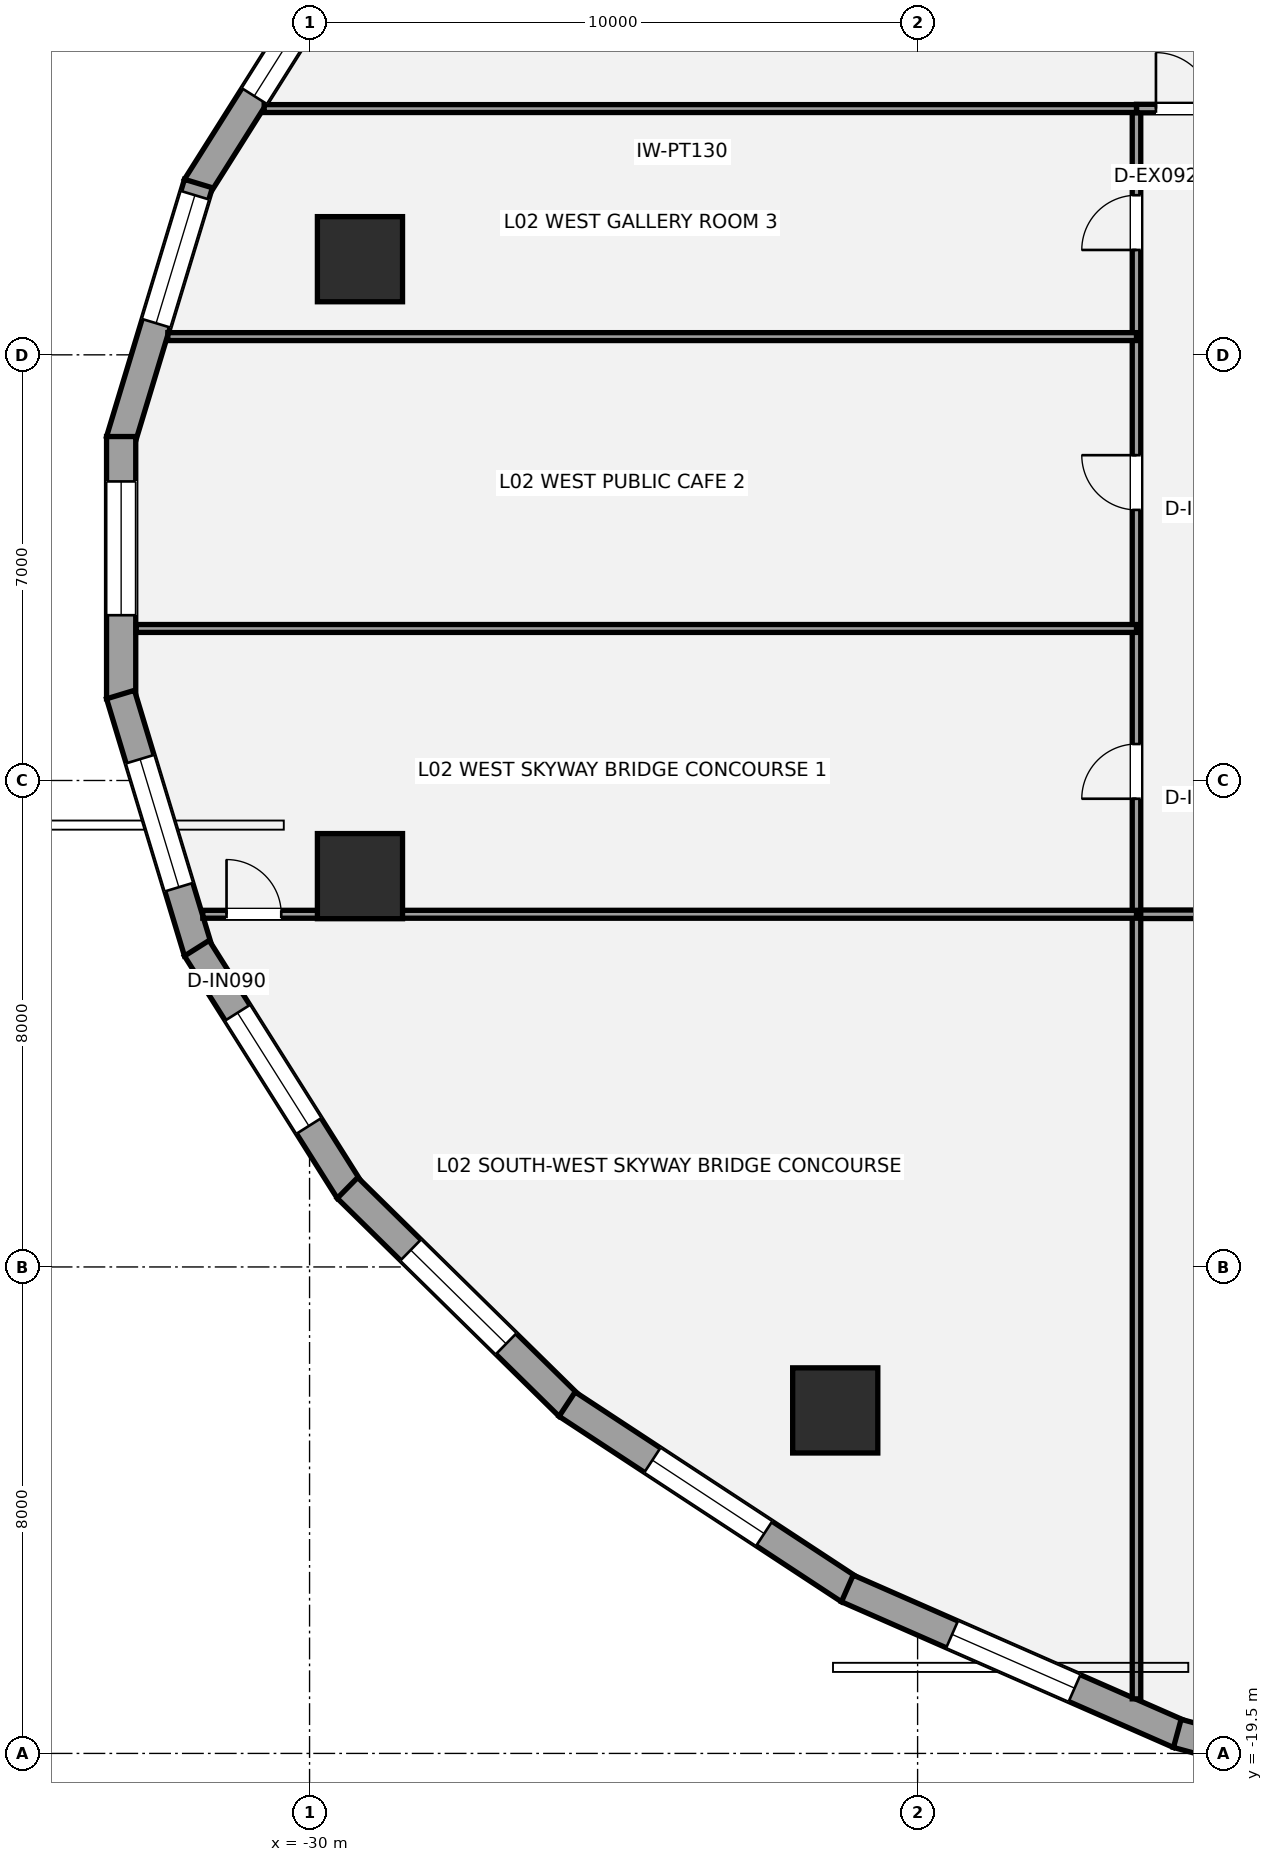
"""IFC4 building model, lengths in metres.
Left out: names, types, materials, properties, quantities, classifications, styles, units other than length and angle.
Written with IfcOpenShell. Run it as: python <this file> out.ifc"""

import sys

from ifc_helpers import new_model, si_unit, direction, frame, frame_2d, origin, origin_2d, place, context, subcontext, project, spatial, rectangle, hollow_circle, extrude, element, fill, save


model = new_model("IFC4")
c1 = context("Model", 3, precision=1e-05, world=origin(), true_north=direction((0.0, 1.0)))
c2 = subcontext(c1, "Body", "Model", "MODEL_VIEW")
j1 = project(units=[si_unit("LENGTHUNIT", "METRE"), si_unit("PLANEANGLEUNIT", "RADIAN")], contexts=[c1])
p1 = place(None, origin())
s1 = spatial("IfcSite", under=j1, at=p1, CompositionType="ELEMENT")
p2 = place(p1, origin())
s2 = spatial("IfcBuilding", under=s1, at=p2, CompositionType="ELEMENT")
p3 = place(p2, frame((0.0, 0.0, 10.2)))
s3 = spatial("IfcBuildingStorey", under=s2, at=p3, CompositionType="ELEMENT", Elevation=10.2)
for number, where, z_axis, x_axis in (
    (1, (-29.171, 5.073, 0.0), (0.0, 0.0, 1.0), (1.0, 0.0, 0.0)),
    (2, (-29.171, -5.073, 0.0), (0.0, 0.0, 1.0), (1.0, 0.0, 0.0)),
    (3, (-21.354, -13.859, 0.0), (0.0, 0.0, 1.0), (1.0, 0.0, 0.0)),
):
    element("IfcColumn", number, at=place(p3, frame(where, z_axis=z_axis, x_axis=x_axis)), inside=s3, PredefinedType="USERDEFINED", context=c2, shape_type="SweptSolid", body=[
        extrude(hollow_circle(Radius=0.7, WallThickness=0.05, at=origin_2d()), origin(), (0.0, 0.0, 1.0), 4.2),
    ])
p4 = place(p3, frame((-31.854, 6.258, 0.0), z_axis=(0.0, 0.0, 1.0), x_axis=(0.53349762721, 0.845801561693, 0.0)))
e4 = element("IfcWall", 4, at=p4, inside=s3, PredefinedType="STANDARD", context=c2, shape_type="SweptSolid", body=[
    extrude(rectangle(XDim=4.711, YDim=0.48, at=frame_2d((2.355, 0.0))), origin(), (0.0, 0.0, 1.0), 3.109),
])
p5 = place(p4, frame((1.771, 0.0, 0.7)))
e5 = element("IfcOpeningElement", 5, at=p5, cuts=e4, PredefinedType="OPENING", context=c2, shape_type="SweptSolid", body=[
    extrude(rectangle(XDim=2.2, YDim=1.95, at=frame_2d((1.1, 0.975))), frame((0.0, 0.25, 0.0), z_axis=(0.0, -1.0, 0.0), x_axis=(1.0, 0.0, 0.0)), (0.0, 0.0, 1.0), 0.5),
])
p6 = place(p3, frame((-33.109, 2.087, 0.0), z_axis=(0.0, 0.0, 1.0), x_axis=(0.289855603468, 0.957070388811, 0.0)))
e6 = element("IfcWall", 6, at=p6, inside=s3, PredefinedType="STANDARD", context=c2, shape_type="SweptSolid", body=[
    extrude(rectangle(XDim=4.419, YDim=0.48, at=frame_2d((2.21, 0.0))), origin(), (0.0, 0.0, 1.0), 3.109),
])
p7 = place(p6, frame((2.02, 0.0, 0.7)))
e7 = element("IfcOpeningElement", 7, at=p7, cuts=e6, PredefinedType="OPENING", context=c2, shape_type="SweptSolid", body=[
    extrude(rectangle(XDim=2.2, YDim=1.95, at=frame_2d((1.1, 0.975))), frame((0.0, 0.25, 0.0), z_axis=(0.0, -1.0, 0.0), x_axis=(1.0, 0.0, 0.0)), (0.0, 0.0, 1.0), 0.5),
])
p8 = place(p3, frame((-33.099, -2.156, 0.0), z_axis=(0.0, 0.0, 1.0), x_axis=(0.0, 1.0, 0.0)))
e8 = element("IfcWall", 8, at=p8, inside=s3, PredefinedType="STANDARD", context=c2, shape_type="SweptSolid", body=[
    extrude(rectangle(XDim=4.313, YDim=0.48, at=frame_2d((2.156, 0.0))), origin(), (0.0, 0.0, 1.0), 3.109),
])
p9 = place(p8, frame((1.375, 0.0, 0.7)))
e9 = element("IfcOpeningElement", 9, at=p9, cuts=e8, PredefinedType="OPENING", context=c2, shape_type="SweptSolid", body=[
    extrude(rectangle(XDim=2.2, YDim=1.95, at=frame_2d((1.1, 0.975))), frame((0.0, 0.25, 0.0), z_axis=(0.0, -1.0, 0.0), x_axis=(1.0, 0.0, 0.0)), (0.0, 0.0, 1.0), 0.5),
])
p10 = place(p3, frame((-31.828, -6.317, 0.0), z_axis=(0.0, 0.0, 1.0), x_axis=(-0.289855603468, 0.957070388811, 0.0)))
e10 = element("IfcWall", 10, at=p10, inside=s3, PredefinedType="STANDARD", context=c2, shape_type="SweptSolid", body=[
    extrude(rectangle(XDim=4.419, YDim=0.48, at=frame_2d((2.21, 0.0))), origin(), (0.0, 0.0, 1.0), 3.109),
])
p11 = place(p10, frame((1.11, 0.0, 0.7)))
e11 = element("IfcOpeningElement", 11, at=p11, cuts=e10, PredefinedType="OPENING", context=c2, shape_type="SweptSolid", body=[
    extrude(rectangle(XDim=2.2, YDim=1.95, at=frame_2d((1.1, 0.975))), frame((0.0, 0.25, 0.0), z_axis=(0.0, -1.0, 0.0), x_axis=(1.0, 0.0, 0.0)), (0.0, 0.0, 1.0), 0.5),
])
p12 = place(p3, frame((-29.341, -10.243, 0.0), z_axis=(0.0, 0.0, 1.0), x_axis=(-0.53349762721, 0.845801561693, 0.0)))
e12 = element("IfcWall", 12, at=p12, inside=s3, PredefinedType="STANDARD", context=c2, shape_type="SweptSolid", body=[
    extrude(rectangle(XDim=4.711, YDim=0.48, at=frame_2d((2.355, 0.0))), origin(), (0.0, 0.0, 1.0), 3.109),
])
p13 = place(p12, frame((1.255, 0.0, 0.7)))
e13 = element("IfcOpeningElement", 13, at=p13, cuts=e12, PredefinedType="OPENING", context=c2, shape_type="SweptSolid", body=[
    extrude(rectangle(XDim=2.2, YDim=1.95, at=frame_2d((1.1, 0.975))), frame((0.0, 0.25, 0.0), z_axis=(0.0, -1.0, 0.0), x_axis=(1.0, 0.0, 0.0)), (0.0, 0.0, 1.0), 0.5),
])
p14 = place(p3, frame((-25.728, -13.785, 0.0), z_axis=(0.0, 0.0, 1.0), x_axis=(-0.713189080178, 0.700971708355, 0.0)))
e14 = element("IfcWall", 14, at=p14, inside=s3, PredefinedType="STANDARD", context=c2, shape_type="SweptSolid", body=[
    extrude(rectangle(XDim=5.116, YDim=0.48, at=frame_2d((2.558, 0.0))), origin(), (0.0, 0.0, 1.0), 3.109),
])
p15 = place(p14, frame((1.458, 0.0, 0.7)))
e15 = element("IfcOpeningElement", 15, at=p15, cuts=e14, PredefinedType="OPENING", context=c2, shape_type="SweptSolid", body=[
    extrude(rectangle(XDim=2.2, YDim=1.95, at=frame_2d((1.1, 0.975))), frame((0.0, 0.25, 0.0), z_axis=(0.0, -1.0, 0.0), x_axis=(1.0, 0.0, 0.0)), (0.0, 0.0, 1.0), 0.5),
])
p16 = place(p3, frame((-21.121, -16.806, 0.0), z_axis=(0.0, 0.0, 1.0), x_axis=(-0.835863918172, 0.548936708827, 0.0)))
e16 = element("IfcWall", 16, at=p16, inside=s3, PredefinedType="STANDARD", context=c2, shape_type="SweptSolid", body=[
    extrude(rectangle(XDim=5.555, YDim=0.48, at=frame_2d((2.778, 0.0))), origin(), (0.0, 0.0, 1.0), 3.109),
])
p17 = place(p16, frame((1.678, 0.0, 0.7)))
e17 = element("IfcOpeningElement", 17, at=p17, cuts=e16, PredefinedType="OPENING", context=c2, shape_type="SweptSolid", body=[
    extrude(rectangle(XDim=2.2, YDim=1.95, at=frame_2d((1.1, 0.975))), frame((0.0, 0.25, 0.0), z_axis=(0.0, -1.0, 0.0), x_axis=(1.0, 0.0, 0.0)), (0.0, 0.0, 1.0), 0.5),
])
p18 = place(p3, frame((-15.695, -19.183, 0.0), z_axis=(0.0, 0.0, 1.0), x_axis=(-0.91570760638, 0.401845218484, 0.0)))
e18 = element("IfcWall", 18, at=p18, inside=s3, PredefinedType="STANDARD", context=c2, shape_type="SweptSolid", body=[
    extrude(rectangle(XDim=5.963, YDim=0.48, at=frame_2d((2.981, 0.0))), origin(), (0.0, 0.0, 1.0), 3.109),
])
p19 = place(p18, frame((1.882, 0.0, 0.7)))
e19 = element("IfcOpeningElement", 19, at=p19, cuts=e18, PredefinedType="OPENING", context=c2, shape_type="SweptSolid", body=[
    extrude(rectangle(XDim=2.2, YDim=1.95, at=frame_2d((1.1, 0.975))), frame((0.0, 0.25, 0.0), z_axis=(0.0, -1.0, 0.0), x_axis=(1.0, 0.0, 0.0)), (0.0, 0.0, 1.0), 0.5),
])
p20 = place(p3, frame((-9.662, -20.821, 0.0), z_axis=(0.0, 0.0, 1.0), x_axis=(-0.964936550718, 0.262483243445, 0.0)))
e20 = element("IfcWall", 20, at=p20, inside=s3, PredefinedType="STANDARD", context=c2, shape_type="SweptSolid", body=[
    extrude(rectangle(XDim=6.288, YDim=0.48, at=frame_2d((3.144, 0.0))), origin(), (0.0, 0.0, 1.0), 3.109),
])
p21 = place(p20, frame((2.044, 0.0, 0.7)))
e21 = element("IfcOpeningElement", 21, at=p21, cuts=e20, PredefinedType="OPENING", context=c2, shape_type="SweptSolid", body=[
    extrude(rectangle(XDim=2.2, YDim=1.95, at=frame_2d((1.1, 0.975))), frame((0.0, 0.25, 0.0), z_axis=(0.0, -1.0, 0.0), x_axis=(1.0, 0.0, 0.0)), (0.0, 0.0, 1.0), 0.5),
])
p22 = place(p3, frame((-16.4, -5.7, 0.0), z_axis=(0.0, 0.0, 1.0), x_axis=(1.0, 0.0, 0.0)))
e22 = element("IfcWall", 22, at=p22, inside=s3, PredefinedType="PARTITIONING", context=c2, shape_type="SweptSolid", body=[
    extrude(rectangle(XDim=32.8, YDim=0.14, at=frame_2d((16.4, 0.0))), origin(), (0.0, 0.0, 1.0), 3.98),
])
p23 = place(p22, frame((4.55, 0.0, 0.0)))
e23 = element("IfcOpeningElement", 23, at=p23, cuts=e22, PredefinedType="OPENING", context=c2, shape_type="SweptSolid", body=[
    extrude(rectangle(XDim=0.9, YDim=2.1, at=frame_2d((0.45, 1.05))), frame((0.0, 0.08, 0.0), z_axis=(0.0, -1.0, 0.0), x_axis=(1.0, 0.0, 0.0)), (0.0, 0.0, 1.0), 0.16),
])
p24 = place(p22, frame((15.95, 0.0, 0.0)))
e24 = element("IfcOpeningElement", 24, at=p24, cuts=e22, PredefinedType="OPENING", context=c2, shape_type="SweptSolid", body=[
    extrude(rectangle(XDim=0.9, YDim=2.1, at=frame_2d((0.45, 1.05))), frame((0.0, 0.08, 0.0), z_axis=(0.0, -1.0, 0.0), x_axis=(1.0, 0.0, 0.0)), (0.0, 0.0, 1.0), 0.16),
])
p25 = place(p22, frame((27.05, 0.0, 0.0)))
e25 = element("IfcOpeningElement", 25, at=p25, cuts=e22, PredefinedType="OPENING", context=c2, shape_type="SweptSolid", body=[
    extrude(rectangle(XDim=1.5, YDim=2.15, at=frame_2d((0.75, 1.075))), frame((0.0, 0.08, 0.0), z_axis=(0.0, -1.0, 0.0), x_axis=(1.0, 0.0, 0.0)), (0.0, 0.0, 1.0), 0.16),
])
p26 = place(p3, frame((-16.4, -18.603, 0.0), z_axis=(0.0, 0.0, 1.0), x_axis=(0.0, 1.0, 0.0)))
e26 = element("IfcWall", 26, at=p26, inside=s3, PredefinedType="PARTITIONING", context=c2, shape_type="SweptSolid", body=[
    extrude(rectangle(XDim=26.153, YDim=0.14, at=frame_2d((13.076, 0.0))), origin(), (0.0, 0.0, 1.0), 3.348),
])
p27 = place(p26, frame((14.802, 0.0, 0.0)))
e27 = element("IfcOpeningElement", 27, at=p27, cuts=e26, PredefinedType="OPENING", context=c2, shape_type="SweptSolid", body=[
    extrude(rectangle(XDim=0.9, YDim=2.1, at=frame_2d((0.45, 1.05))), frame((0.0, 0.08, 0.0), z_axis=(0.0, -1.0, 0.0), x_axis=(1.0, 0.0, 0.0)), (0.0, 0.0, 1.0), 0.16),
])
p28 = place(p26, frame((19.552, 0.0, 0.0)))
e28 = element("IfcOpeningElement", 28, at=p28, cuts=e26, PredefinedType="OPENING", context=c2, shape_type="SweptSolid", body=[
    extrude(rectangle(XDim=0.9, YDim=2.1, at=frame_2d((0.45, 1.05))), frame((0.0, 0.08, 0.0), z_axis=(0.0, -1.0, 0.0), x_axis=(1.0, 0.0, 0.0)), (0.0, 0.0, 1.0), 0.16),
])
p29 = place(p26, frame((23.827, 0.0, 0.0)))
e29 = element("IfcOpeningElement", 29, at=p29, cuts=e26, PredefinedType="OPENING", context=c2, shape_type="SweptSolid", body=[
    extrude(rectangle(XDim=0.9, YDim=2.1, at=frame_2d((0.45, 1.05))), frame((0.0, 0.08, 0.0), z_axis=(0.0, -1.0, 0.0), x_axis=(1.0, 0.0, 0.0)), (0.0, 0.0, 1.0), 0.16),
])
p30 = place(p3, frame((-16.4, 7.55, 0.0), z_axis=(0.0, 0.0, 1.0), x_axis=(1.0, 0.0, 0.0)))
e30 = element("IfcWall", 30, at=p30, inside=s3, PredefinedType="PARTITIONING", context=c2, shape_type="SweptSolid", body=[
    extrude(rectangle(XDim=2.35, YDim=0.14, at=frame_2d((1.175, 0.0))), origin(), (0.0, 0.0, 1.0), 3.433),
])
p31 = place(p30, frame((0.32, 0.0, 0.0)))
e31 = element("IfcOpeningElement", 31, at=p31, cuts=e30, PredefinedType="OPENING", context=c2, shape_type="SweptSolid", body=[
    extrude(rectangle(XDim=0.92, YDim=2.15, at=frame_2d((0.46, 1.075))), frame((0.0, 0.08, 0.0), z_axis=(0.0, -1.0, 0.0), x_axis=(1.0, 0.0, 0.0)), (0.0, 0.0, 1.0), 0.16),
])
p32 = place(p3, frame((-30.747, 7.55, 0.0), z_axis=(0.0, 0.0, 1.0), x_axis=(1.0, 0.0, 0.0)))
e32 = element("IfcWall", 32, at=p32, inside=s3, PredefinedType="PARTITIONING", context=c2, shape_type="SweptSolid", body=[
    extrude(rectangle(XDim=14.347, YDim=0.13, at=frame_2d((7.173, 0.0))), origin(), (0.0, 0.0, 1.0), 2.958),
])
p33 = place(p3, frame((-31.756, -5.7, 0.0), z_axis=(0.0, 0.0, 1.0), x_axis=(1.0, 0.0, 0.0)))
e33 = element("IfcWall", 33, at=p33, inside=s3, PredefinedType="PARTITIONING", context=c2, shape_type="SweptSolid", body=[
    extrude(rectangle(XDim=15.356, YDim=0.13, at=frame_2d((7.678, 0.0))), origin(), (0.0, 0.0, 1.0), 2.958),
])
p34 = place(p33, frame((0.39, 0.0, 0.0)))
e34 = element("IfcOpeningElement", 34, at=p34, cuts=e33, PredefinedType="OPENING", context=c2, shape_type="SweptSolid", body=[
    extrude(rectangle(XDim=0.9, YDim=2.1, at=frame_2d((0.45, 1.05))), frame((0.0, 0.075, 0.0), z_axis=(0.0, -1.0, 0.0), x_axis=(1.0, 0.0, 0.0)), (0.0, 0.0, 1.0), 0.15),
])
p35 = place(p3, frame((-32.851, -1.0, 0.0), z_axis=(0.0, 0.0, 1.0), x_axis=(1.0, 0.0, 0.0)))
e35 = element("IfcWall", 35, at=p35, inside=s3, PredefinedType="PARTITIONING", context=c2, shape_type="SweptSolid", body=[
    extrude(rectangle(XDim=16.451, YDim=0.13, at=frame_2d((8.225, 0.0))), origin(), (0.0, 0.0, 1.0), 3.348),
])
p36 = place(p3, frame((-32.331, 3.8, 0.0), z_axis=(0.0, 0.0, 1.0), x_axis=(1.0, 0.0, 0.0)))
e36 = element("IfcWall", 36, at=p36, inside=s3, PredefinedType="PARTITIONING", context=c2, shape_type="SweptSolid", body=[
    extrude(rectangle(XDim=15.931, YDim=0.13, at=frame_2d((7.966, 0.0))), origin(), (0.0, 0.0, 1.0), 3.348),
])
p37 = place(p5, origin())
e37 = element("IfcWindow", 37, at=p37, inside=s3, PartitioningType="SINGLE_PANEL", PredefinedType="WINDOW", context=c2, shape_type="SweptSolid", body=[
    extrude(rectangle(XDim=2.2, YDim=1.95, at=frame_2d((1.1, 0.975))), frame((0.0, -0.01, 0.0), z_axis=(0.0, -1.0, 0.0), x_axis=(1.0, 0.0, 0.0)), (0.0, 0.0, 1.0), 0.06),
])
fill(e5, e37)
p38 = place(p7, origin())
e38 = element("IfcWindow", 38, at=p38, inside=s3, PartitioningType="SINGLE_PANEL", PredefinedType="WINDOW", context=c2, shape_type="SweptSolid", body=[
    extrude(rectangle(XDim=2.2, YDim=1.95, at=frame_2d((1.1, 0.975))), frame((0.0, -0.01, 0.0), z_axis=(0.0, -1.0, 0.0), x_axis=(1.0, 0.0, 0.0)), (0.0, 0.0, 1.0), 0.06),
])
fill(e7, e38)
p39 = place(p9, origin())
e39 = element("IfcWindow", 39, at=p39, inside=s3, PartitioningType="SINGLE_PANEL", PredefinedType="WINDOW", context=c2, shape_type="SweptSolid", body=[
    extrude(rectangle(XDim=2.2, YDim=1.95, at=frame_2d((1.1, 0.975))), frame((0.0, -0.01, 0.0), z_axis=(0.0, -1.0, 0.0), x_axis=(1.0, 0.0, 0.0)), (0.0, 0.0, 1.0), 0.06),
])
fill(e9, e39)
p40 = place(p11, origin())
e40 = element("IfcWindow", 40, at=p40, inside=s3, PartitioningType="SINGLE_PANEL", PredefinedType="WINDOW", context=c2, shape_type="SweptSolid", body=[
    extrude(rectangle(XDim=2.2, YDim=1.95, at=frame_2d((1.1, 0.975))), frame((0.0, -0.01, 0.0), z_axis=(0.0, -1.0, 0.0), x_axis=(1.0, 0.0, 0.0)), (0.0, 0.0, 1.0), 0.06),
])
fill(e11, e40)
p41 = place(p13, origin())
e41 = element("IfcWindow", 41, at=p41, inside=s3, PartitioningType="SINGLE_PANEL", PredefinedType="WINDOW", context=c2, shape_type="SweptSolid", body=[
    extrude(rectangle(XDim=2.2, YDim=1.95, at=frame_2d((1.1, 0.975))), frame((0.0, -0.01, 0.0), z_axis=(0.0, -1.0, 0.0), x_axis=(1.0, 0.0, 0.0)), (0.0, 0.0, 1.0), 0.06),
])
fill(e13, e41)
p42 = place(p15, origin())
e42 = element("IfcWindow", 42, at=p42, inside=s3, PartitioningType="SINGLE_PANEL", PredefinedType="WINDOW", context=c2, shape_type="SweptSolid", body=[
    extrude(rectangle(XDim=2.2, YDim=1.95, at=frame_2d((1.1, 0.975))), frame((0.0, -0.01, 0.0), z_axis=(0.0, -1.0, 0.0), x_axis=(1.0, 0.0, 0.0)), (0.0, 0.0, 1.0), 0.06),
])
fill(e15, e42)
p43 = place(p17, origin())
e43 = element("IfcWindow", 43, at=p43, inside=s3, PartitioningType="SINGLE_PANEL", PredefinedType="WINDOW", context=c2, shape_type="SweptSolid", body=[
    extrude(rectangle(XDim=2.2, YDim=1.95, at=frame_2d((1.1, 0.975))), frame((0.0, -0.01, 0.0), z_axis=(0.0, -1.0, 0.0), x_axis=(1.0, 0.0, 0.0)), (0.0, 0.0, 1.0), 0.06),
])
fill(e17, e43)
p44 = place(p19, origin())
e44 = element("IfcWindow", 44, at=p44, inside=s3, PartitioningType="SINGLE_PANEL", PredefinedType="WINDOW", context=c2, shape_type="SweptSolid", body=[
    extrude(rectangle(XDim=2.2, YDim=1.95, at=frame_2d((1.1, 0.975))), frame((0.0, -0.01, 0.0), z_axis=(0.0, -1.0, 0.0), x_axis=(1.0, 0.0, 0.0)), (0.0, 0.0, 1.0), 0.06),
])
fill(e19, e44)
p45 = place(p31, origin())
e45 = element("IfcDoor", 45, at=p45, inside=s3, OperationType="SINGLE_SWING_LEFT", PredefinedType="DOOR", context=c2, shape_type="SweptSolid", body=[
    extrude(rectangle(XDim=0.92, YDim=2.15, at=frame_2d((0.46, 1.075))), frame((0.0, 0.025, 0.0), z_axis=(0.0, -1.0, 0.0), x_axis=(1.0, 0.0, 0.0)), (0.0, 0.0, 1.0), 0.05),
])
fill(e31, e45)
p46 = place(p34, origin())
e46 = element("IfcDoor", 46, at=p46, inside=s3, OperationType="SINGLE_SWING_LEFT", PredefinedType="DOOR", context=c2, shape_type="SweptSolid", body=[
    extrude(rectangle(XDim=0.9, YDim=2.1, at=frame_2d((0.45, 1.05))), frame((0.0, 0.025, 0.0), z_axis=(0.0, -1.0, 0.0), x_axis=(1.0, 0.0, 0.0)), (0.0, 0.0, 1.0), 0.05),
])
fill(e34, e46)
p47 = place(p27, origin())
e47 = element("IfcDoor", 47, at=p47, inside=s3, OperationType="SINGLE_SWING_LEFT", PredefinedType="DOOR", context=c2, shape_type="SweptSolid", body=[
    extrude(rectangle(XDim=0.9, YDim=2.1, at=frame_2d((0.45, 1.05))), frame((0.0, 0.025, 0.0), z_axis=(0.0, -1.0, 0.0), x_axis=(1.0, 0.0, 0.0)), (0.0, 0.0, 1.0), 0.05),
])
fill(e27, e47)
p48 = place(p28, origin())
e48 = element("IfcDoor", 48, at=p48, inside=s3, OperationType="SINGLE_SWING_RIGHT", PredefinedType="DOOR", context=c2, shape_type="SweptSolid", body=[
    extrude(rectangle(XDim=0.9, YDim=2.1, at=frame_2d((0.45, 1.05))), frame((0.0, 0.025, 0.0), z_axis=(0.0, -1.0, 0.0), x_axis=(1.0, 0.0, 0.0)), (0.0, 0.0, 1.0), 0.05),
])
fill(e28, e48)
p49 = place(p29, origin())
e49 = element("IfcDoor", 49, at=p49, inside=s3, OperationType="SINGLE_SWING_LEFT", PredefinedType="DOOR", context=c2, shape_type="SweptSolid", body=[
    extrude(rectangle(XDim=0.9, YDim=2.1, at=frame_2d((0.45, 1.05))), frame((0.0, 0.025, 0.0), z_axis=(0.0, -1.0, 0.0), x_axis=(1.0, 0.0, 0.0)), (0.0, 0.0, 1.0), 0.05),
])
fill(e29, e49)
save(model, sys.argv[1])
